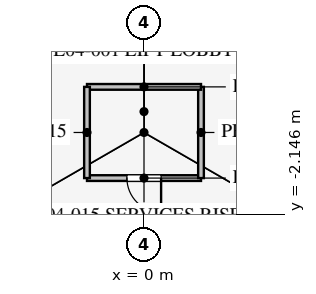
"""IFC4 building model, lengths in metres.
Left out: names, types, materials, properties, quantities, classifications, styles, units other than length and angle.
Written with IfcOpenShell. Run it as: python <this file> out.ifc"""

import sys

from ifc_helpers import new_model, si_unit, direction, frame, frame_2d, origin, place, context, subcontext, project, spatial, rectangle, extrude, element, fill, save


model = new_model("IFC4")
c1 = context("Model", 3, precision=1e-05, world=origin(), true_north=direction((0.0, 1.0)))
c2 = subcontext(c1, "Body", "Model", "MODEL_VIEW")
j1 = project(units=[si_unit("LENGTHUNIT", "METRE"), si_unit("PLANEANGLEUNIT", "RADIAN")], contexts=[c1])
p1 = place(None, origin())
s1 = spatial("IfcSite", under=j1, at=p1, CompositionType="ELEMENT")
p2 = place(p1, origin())
s2 = spatial("IfcBuilding", under=s1, at=p2, CompositionType="ELEMENT")
p3 = place(p2, frame((0.0, 0.0, 20.7)))
s3 = spatial("IfcBuildingStorey", under=s2, at=p3, CompositionType="ELEMENT", Elevation=20.7)
p4 = place(p3, frame((-1.5, -1.2, 0.0), z_axis=(0.0, 0.0, 1.0), x_axis=(1.0, 0.0, 0.0)))
e1 = element("IfcWall", 1, at=p4, inside=s3, PredefinedType="PARTITIONING", context=c2, shape_type="SweptSolid", body=[
    extrude(rectangle(XDim=3.0, YDim=0.15, at=frame_2d((1.5, 0.0))), origin(), (0.0, 0.0, 1.0), 4.0),
])
p5 = place(p4, frame((1.05, 0.0, 0.0)))
e2 = element("IfcOpeningElement", 2, at=p5, cuts=e1, PredefinedType="OPENING", context=c2, shape_type="SweptSolid", body=[
    extrude(rectangle(XDim=0.9, YDim=2.1, at=frame_2d((0.45, 1.05))), frame((0.0, 0.085, 0.0), z_axis=(0.0, -1.0, 0.0), x_axis=(1.0, 0.0, 0.0)), (0.0, 0.0, 1.0), 0.17),
])
p6 = place(p3, frame((1.5, -1.2, 0.0), z_axis=(0.0, 0.0, 1.0), x_axis=(0.0, 1.0, 0.0)))
e3 = element("IfcWall", 3, at=p6, inside=s3, PredefinedType="PARTITIONING", context=c2, shape_type="SweptSolid", body=[
    extrude(rectangle(XDim=2.4, YDim=0.15, at=frame_2d((1.2, 0.0))), origin(), (0.0, 0.0, 1.0), 4.0),
])
p7 = place(p3, frame((1.5, 1.2, 0.0), z_axis=(0.0, 0.0, 1.0), x_axis=(-1.0, 0.0, 0.0)))
e4 = element("IfcWall", 4, at=p7, inside=s3, PredefinedType="PARTITIONING", context=c2, shape_type="SweptSolid", body=[
    extrude(rectangle(XDim=3.0, YDim=0.15, at=frame_2d((1.5, 0.0))), origin(), (0.0, 0.0, 1.0), 4.0),
])
p8 = place(p3, frame((-1.5, 1.2, 0.0), z_axis=(0.0, 0.0, 1.0), x_axis=(0.0, -1.0, 0.0)))
e5 = element("IfcWall", 5, at=p8, inside=s3, PredefinedType="PARTITIONING", context=c2, shape_type="SweptSolid", body=[
    extrude(rectangle(XDim=2.4, YDim=0.15, at=frame_2d((1.2, 0.0))), origin(), (0.0, 0.0, 1.0), 4.0),
])
p9 = place(p5, frame((0.9, 0.0, 0.0), z_axis=(0.0, 0.0, 1.0), x_axis=(-1.0, 0.0, 0.0)))
e6 = element("IfcDoor", 6, at=p9, inside=s3, OperationType="SINGLE_SWING_LEFT", PredefinedType="DOOR", context=c2, shape_type="SweptSolid", body=[
    extrude(rectangle(XDim=0.9, YDim=2.1, at=frame_2d((0.45, 1.05))), frame((0.0, 0.025, 0.0), z_axis=(0.0, -1.0, 0.0), x_axis=(1.0, 0.0, 0.0)), (0.0, 0.0, 1.0), 0.05),
])
fill(e2, e6)
save(model, sys.argv[1])
